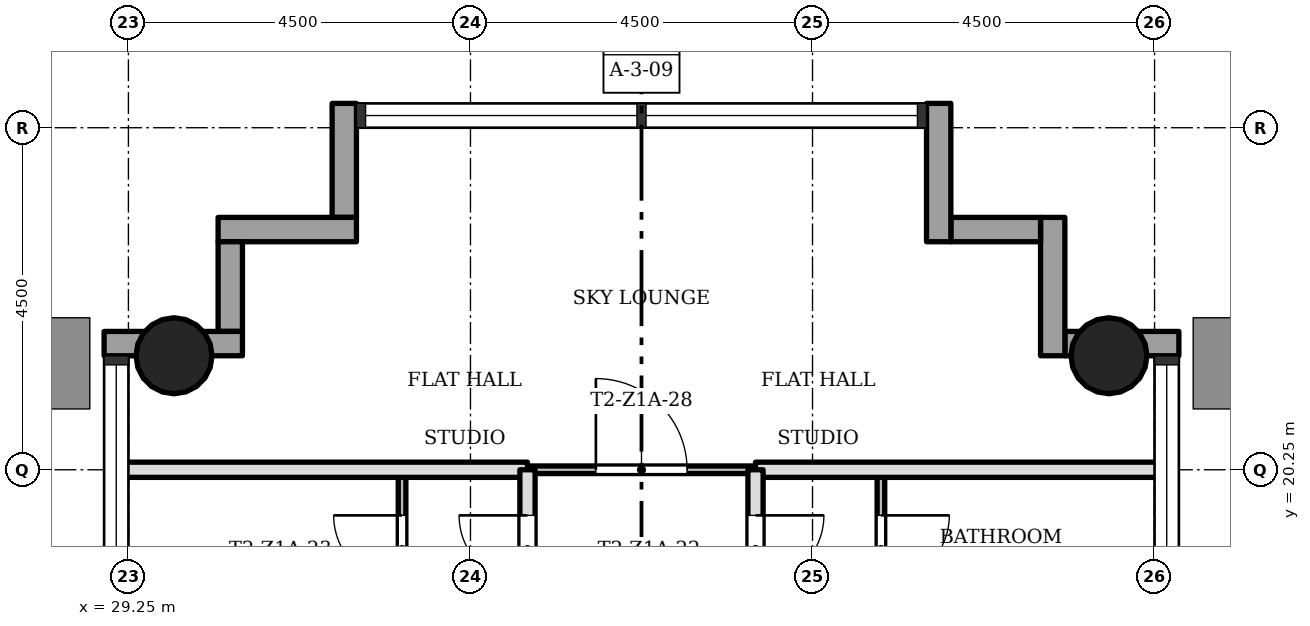
"""IFC4 building model, lengths in metres.
Left out: names, types, materials, properties, quantities, classifications, styles, units other than length and angle.
Written with IfcOpenShell. Run it as: python <this file> out.ifc"""

import sys

from ifc_helpers import new_model, si_unit, direction, frame, frame_2d, origin, origin_2d, place, context, subcontext, project, spatial, rectangle, hollow_circle, extrude, element, fill, save


model = new_model("IFC4")
c1 = context("Model", 3, precision=1e-05, world=origin(), true_north=direction((0.0, 1.0)))
c2 = subcontext(c1, "Body", "Model", "MODEL_VIEW")
j1 = project(units=[si_unit("LENGTHUNIT", "METRE"), si_unit("PLANEANGLEUNIT", "RADIAN")], contexts=[c1])
p1 = place(None, origin())
s1 = spatial("IfcSite", under=j1, at=p1, CompositionType="ELEMENT")
p2 = place(p1, origin())
s2 = spatial("IfcBuilding", under=s1, at=p2, CompositionType="ELEMENT")
p3 = place(p2, frame((0.0, 0.0, 31.3)))
s3 = spatial("IfcBuildingStorey", under=s2, at=p3, CompositionType="ELEMENT", Elevation=31.3)
for number, where, z_axis, x_axis in (
    (1, (42.15, 21.75, 0.0), (0.0, 0.0, 1.0), (1.0, 0.0, 0.0)),
    (2, (29.85, 21.75, 0.0), (0.0, 0.0, 1.0), (1.0, 0.0, 0.0)),
):
    element("IfcColumn", number, at=place(p3, frame(where, z_axis=z_axis, x_axis=x_axis)), inside=s3, PredefinedType="COLUMN", context=c2, shape_type="SweptSolid", body=[
        extrude(hollow_circle(Radius=0.5, WallThickness=0.036, at=origin_2d()), origin(), (0.0, 0.0, 1.0), 3.4),
    ])
p4 = place(p3, frame((43.07, 21.91, -0.3), z_axis=(0.0, 0.0, 1.0), x_axis=(-1.0, 0.0, 0.0)))
e3 = element("IfcWall", 3, at=p4, inside=s3, PredefinedType="STANDARD", context=c2, shape_type="SweptSolid", body=[
    extrude(rectangle(XDim=1.5, YDim=0.32, at=frame_2d((0.75, 0.0))), origin(), (0.0, 0.0, 1.0), 3.4),
])
p5 = place(p3, frame((41.41, 21.75, -0.3), z_axis=(0.0, 0.0, 1.0), x_axis=(0.0, 1.0, 0.0)))
e4 = element("IfcWall", 4, at=p5, inside=s3, PredefinedType="STANDARD", context=c2, shape_type="SweptSolid", body=[
    extrude(rectangle(XDim=1.82, YDim=0.32, at=frame_2d((0.91, 0.0))), origin(), (0.0, 0.0, 1.0), 3.4),
])
p6 = place(p3, frame((41.25, 23.41, -0.3), z_axis=(0.0, 0.0, 1.0), x_axis=(-1.0, 0.0, 0.0)))
e5 = element("IfcWall", 5, at=p6, inside=s3, PredefinedType="STANDARD", context=c2, shape_type="SweptSolid", body=[
    extrude(rectangle(XDim=1.18, YDim=0.32, at=frame_2d((0.59, 0.0))), origin(), (0.0, 0.0, 1.0), 3.4),
])
p7 = place(p3, frame((39.91, 23.25, -0.3), z_axis=(0.0, 0.0, 1.0), x_axis=(0.0, 1.0, 0.0)))
e6 = element("IfcWall", 6, at=p7, inside=s3, PredefinedType="STANDARD", context=c2, shape_type="SweptSolid", body=[
    extrude(rectangle(XDim=1.82, YDim=0.32, at=frame_2d((0.91, 0.0))), origin(), (0.0, 0.0, 1.0), 3.4),
])
p8 = place(p3, frame((32.09, 25.07, -0.3), z_axis=(0.0, 0.0, 1.0), x_axis=(0.0, -1.0, 0.0)))
e7 = element("IfcWall", 7, at=p8, inside=s3, PredefinedType="STANDARD", context=c2, shape_type="SweptSolid", body=[
    extrude(rectangle(XDim=1.5, YDim=0.32, at=frame_2d((0.75, 0.0))), origin(), (0.0, 0.0, 1.0), 3.4),
])
p9 = place(p3, frame((32.25, 23.41, -0.3), z_axis=(0.0, 0.0, 1.0), x_axis=(-1.0, 0.0, 0.0)))
e8 = element("IfcWall", 8, at=p9, inside=s3, PredefinedType="STANDARD", context=c2, shape_type="SweptSolid", body=[
    extrude(rectangle(XDim=1.82, YDim=0.32, at=frame_2d((0.91, 0.0))), origin(), (0.0, 0.0, 1.0), 3.4),
])
p10 = place(p3, frame((30.59, 23.25, -0.3), z_axis=(0.0, 0.0, 1.0), x_axis=(0.0, -1.0, 0.0)))
e9 = element("IfcWall", 9, at=p10, inside=s3, PredefinedType="STANDARD", context=c2, shape_type="SweptSolid", body=[
    extrude(rectangle(XDim=1.18, YDim=0.32, at=frame_2d((0.59, 0.0))), origin(), (0.0, 0.0, 1.0), 3.4),
])
p11 = place(p3, frame((30.75, 21.91, -0.3), z_axis=(0.0, 0.0, 1.0), x_axis=(-1.0, 0.0, 0.0)))
e10 = element("IfcWall", 10, at=p11, inside=s3, PredefinedType="STANDARD", context=c2, shape_type="SweptSolid", body=[
    extrude(rectangle(XDim=1.82, YDim=0.32, at=frame_2d((0.91, 0.0))), origin(), (0.0, 0.0, 1.0), 3.4),
])
p12 = place(p3, frame((37.5, 20.25, 0.0), z_axis=(0.0, 0.0, 1.0), x_axis=(-1.0, 0.0, 0.0)))
e11 = element("IfcWall", 11, at=p12, inside=s3, PredefinedType="PARTITIONING", context=c2, shape_type="SweptSolid", body=[
    extrude(rectangle(XDim=3.0, YDim=0.1, at=frame_2d((1.5, 0.0))), origin(), (0.0, 0.0, 1.0), 3.0),
])
p13 = place(p12, frame((0.9, 0.0, 0.0)))
e12 = element("IfcOpeningElement", 12, at=p13, cuts=e11, PredefinedType="OPENING", context=c2, shape_type="SweptSolid", body=[
    extrude(rectangle(XDim=1.2, YDim=2.1, at=frame_2d((0.6, 1.05))), frame((0.0, 0.06, 0.0), z_axis=(0.0, -1.0, 0.0), x_axis=(1.0, 0.0, 0.0)), (0.0, 0.0, 1.0), 0.12),
])
for number, where, z_axis, x_axis in (
    (13, (42.85, 20.25, 0.0), (0.0, 0.0, 1.0), (-1.0, 0.0, 0.0)),
    (14, (34.5, 20.25, 0.0), (0.0, 0.0, 1.0), (-1.0, 0.0, 0.0)),
):
    element("IfcWall", number, at=place(p3, frame(where, z_axis=z_axis, x_axis=x_axis)), inside=s3, PredefinedType="SOLIDWALL", context=c2, shape_type="SweptSolid", body=[
        extrude(rectangle(XDim=5.35, YDim=0.2, at=frame_2d((2.675, 0.0))), origin(), (0.0, 0.0, 1.0), 3.0),
    ])
p14 = place(p3, frame((39.15, 15.75, 0.0), z_axis=(0.0, 0.0, 1.0), x_axis=(0.0, 1.0, 0.0)))
e15 = element("IfcWall", 15, at=p14, inside=s3, PredefinedType="PARTITIONING", context=c2, shape_type="SweptSolid", body=[
    extrude(rectangle(XDim=4.5, YDim=0.1, at=frame_2d((2.25, 0.0))), origin(), (0.0, 0.0, 1.0), 3.0),
])
p15 = place(p14, frame((3.0, 0.0, 0.0)))
e16 = element("IfcOpeningElement", 16, at=p15, cuts=e15, PredefinedType="OPENING", context=c2, shape_type="SweptSolid", body=[
    extrude(rectangle(XDim=0.9, YDim=2.1, at=frame_2d((0.45, 1.05))), frame((0.0, 0.06, 0.0), z_axis=(0.0, -1.0, 0.0), x_axis=(1.0, 0.0, 0.0)), (0.0, 0.0, 1.0), 0.12),
])
p16 = place(p3, frame((37.5, 15.75, 0.0), z_axis=(0.0, 0.0, 1.0), x_axis=(0.0, 1.0, 0.0)))
e17 = element("IfcWall", 17, at=p16, inside=s3, PredefinedType="SOLIDWALL", context=c2, shape_type="SweptSolid", body=[
    extrude(rectangle(XDim=4.5, YDim=0.2, at=frame_2d((2.25, 0.0))), origin(), (0.0, 0.0, 1.0), 3.0),
])
p17 = place(p16, frame((3.0, 0.0, 0.0)))
e18 = element("IfcOpeningElement", 18, at=p17, cuts=e17, PredefinedType="OPENING", context=c2, shape_type="SweptSolid", body=[
    extrude(rectangle(XDim=0.9, YDim=2.1, at=frame_2d((0.45, 1.05))), frame((0.0, 0.11, 0.0), z_axis=(0.0, -1.0, 0.0), x_axis=(1.0, 0.0, 0.0)), (0.0, 0.0, 1.0), 0.22),
])
p18 = place(p3, frame((34.5, 15.75, 0.0), z_axis=(0.0, 0.0, 1.0), x_axis=(0.0, 1.0, 0.0)))
e19 = element("IfcWall", 19, at=p18, inside=s3, PredefinedType="SOLIDWALL", context=c2, shape_type="SweptSolid", body=[
    extrude(rectangle(XDim=4.5, YDim=0.2, at=frame_2d((2.25, 0.0))), origin(), (0.0, 0.0, 1.0), 3.0),
])
p19 = place(p18, frame((3.0, 0.0, 0.0)))
e20 = element("IfcOpeningElement", 20, at=p19, cuts=e19, PredefinedType="OPENING", context=c2, shape_type="SweptSolid", body=[
    extrude(rectangle(XDim=0.9, YDim=2.1, at=frame_2d((0.45, 1.05))), frame((0.0, 0.11, 0.0), z_axis=(0.0, -1.0, 0.0), x_axis=(1.0, 0.0, 0.0)), (0.0, 0.0, 1.0), 0.22),
])
p20 = place(p3, frame((32.85, 15.75, 0.0), z_axis=(0.0, 0.0, 1.0), x_axis=(0.0, 1.0, 0.0)))
e21 = element("IfcWall", 21, at=p20, inside=s3, PredefinedType="PARTITIONING", context=c2, shape_type="SweptSolid", body=[
    extrude(rectangle(XDim=4.5, YDim=0.1, at=frame_2d((2.25, 0.0))), origin(), (0.0, 0.0, 1.0), 3.0),
])
p21 = place(p20, frame((3.0, 0.0, 0.0)))
e22 = element("IfcOpeningElement", 22, at=p21, cuts=e21, PredefinedType="OPENING", context=c2, shape_type="SweptSolid", body=[
    extrude(rectangle(XDim=0.9, YDim=2.1, at=frame_2d((0.45, 1.05))), frame((0.0, 0.06, 0.0), z_axis=(0.0, -1.0, 0.0), x_axis=(1.0, 0.0, 0.0)), (0.0, 0.0, 1.0), 0.12),
])
p22 = place(p19, origin())
e23 = element("IfcDoor", 23, at=p22, inside=s3, OperationType="SINGLE_SWING_LEFT", PredefinedType="DOOR", context=c2, shape_type="SweptSolid", body=[
    extrude(rectangle(XDim=0.9, YDim=2.1, at=frame_2d((0.45, 1.05))), frame((0.0, 0.025, 0.0), z_axis=(0.0, -1.0, 0.0), x_axis=(1.0, 0.0, 0.0)), (0.0, 0.0, 1.0), 0.05),
])
fill(e20, e23)
p23 = place(p21, origin())
e24 = element("IfcDoor", 24, at=p23, inside=s3, OperationType="SINGLE_SWING_LEFT", PredefinedType="DOOR", context=c2, shape_type="SweptSolid", body=[
    extrude(rectangle(XDim=0.9, YDim=2.1, at=frame_2d((0.45, 1.05))), frame((0.0, 0.025, 0.0), z_axis=(0.0, -1.0, 0.0), x_axis=(1.0, 0.0, 0.0)), (0.0, 0.0, 1.0), 0.05),
])
fill(e22, e24)
p24 = place(p17, origin())
e25 = element("IfcDoor", 25, at=p24, inside=s3, OperationType="SINGLE_SWING_RIGHT", PredefinedType="DOOR", context=c2, shape_type="SweptSolid", body=[
    extrude(rectangle(XDim=0.9, YDim=2.1, at=frame_2d((0.45, 1.05))), frame((0.0, 0.025, 0.0), z_axis=(0.0, -1.0, 0.0), x_axis=(1.0, 0.0, 0.0)), (0.0, 0.0, 1.0), 0.05),
])
fill(e18, e25)
p25 = place(p15, origin())
e26 = element("IfcDoor", 26, at=p25, inside=s3, OperationType="SINGLE_SWING_RIGHT", PredefinedType="DOOR", context=c2, shape_type="SweptSolid", body=[
    extrude(rectangle(XDim=0.9, YDim=2.1, at=frame_2d((0.45, 1.05))), frame((0.0, 0.025, 0.0), z_axis=(0.0, -1.0, 0.0), x_axis=(1.0, 0.0, 0.0)), (0.0, 0.0, 1.0), 0.05),
])
fill(e16, e26)
p26 = place(p13, origin())
e27 = element("IfcDoor", 27, at=p26, inside=s3, OperationType="SINGLE_SWING_RIGHT", PredefinedType="DOOR", context=c2, shape_type="SweptSolid", body=[
    extrude(rectangle(XDim=1.2, YDim=2.1, at=frame_2d((0.6, 1.05))), frame((0.0, 0.025, 0.0), z_axis=(0.0, -1.0, 0.0), x_axis=(1.0, 0.0, 0.0)), (0.0, 0.0, 1.0), 0.05),
])
fill(e12, e27)
save(model, sys.argv[1])
